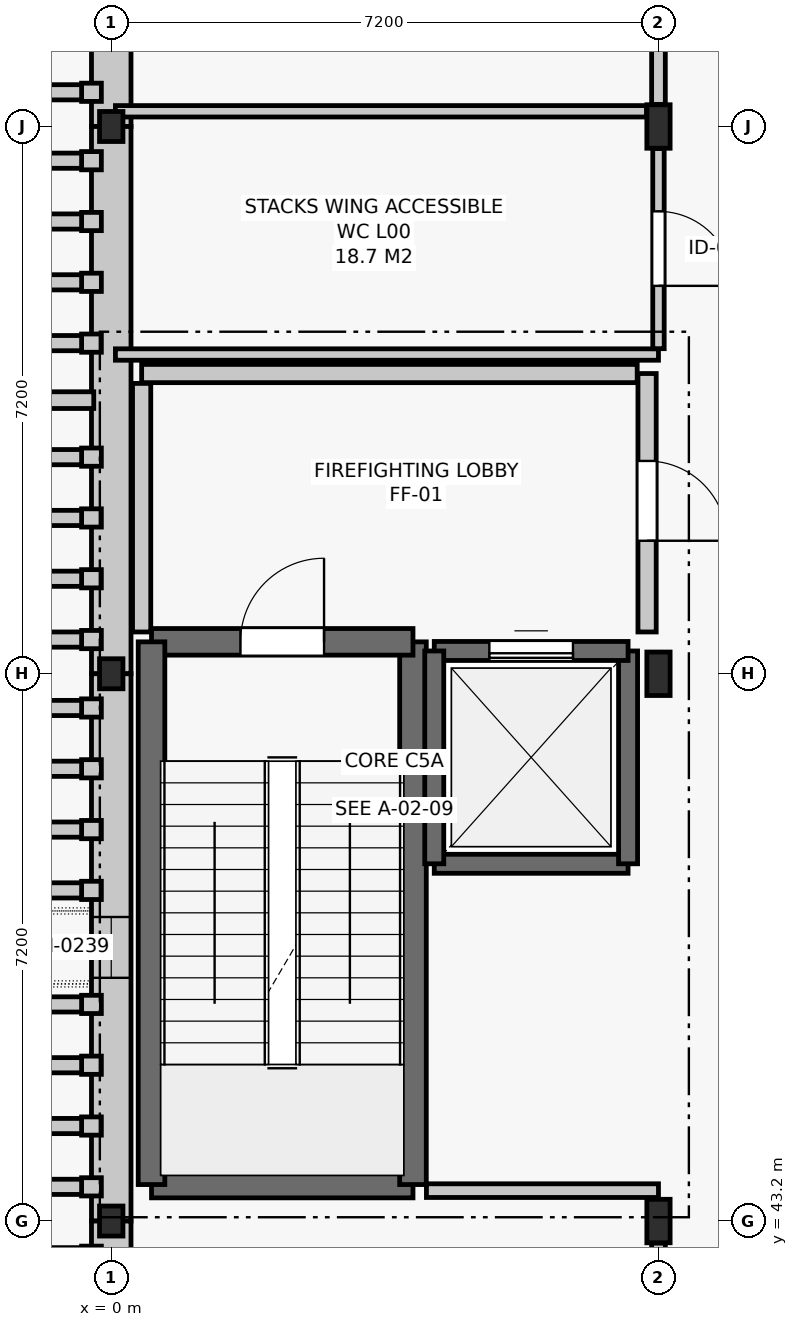
"""IFC4 building model, lengths in metres.
Left out: names, types, materials, properties, quantities, classifications, styles, units other than length and angle.
Written with IfcOpenShell. Run it as: python <this file> out.ifc"""

import sys

from ifc_helpers import new_model, si_unit, direction, frame, frame_2d, origin, origin_2d, place, context, subcontext, project, spatial, rectangle, i_section, extrude, element, fill, save


model = new_model("IFC4")
c1 = context("Model", 3, precision=1e-05, world=origin(), true_north=direction((0.0, 1.0)))
c2 = subcontext(c1, "Body", "Model", "MODEL_VIEW")
j1 = project(units=[si_unit("LENGTHUNIT", "METRE"), si_unit("PLANEANGLEUNIT", "RADIAN")], contexts=[c1])
p1 = place(None, origin())
s1 = spatial("IfcSite", under=j1, at=p1, CompositionType="ELEMENT")
p2 = place(p1, origin())
s2 = spatial("IfcBuilding", under=s1, at=p2, CompositionType="ELEMENT")
p3 = place(p2, origin())
s3 = spatial("IfcBuildingStorey", under=s2, at=p3, CompositionType="ELEMENT", Elevation=0.0)
for number, where, z_axis, x_axis in (
    (1, (0.0, 43.2, 0.0), (0.0, 0.0, 1.0), (1.0, 0.0, 0.0)),
    (2, (0.0, 50.4, 0.0), (0.0, 0.0, 1.0), (1.0, 0.0, 0.0)),
    (3, (0.0, 57.6, 0.0), (0.0, 0.0, 1.0), (1.0, 0.0, 0.0)),
):
    element("IfcColumn", number, at=place(p3, frame(where, z_axis=z_axis, x_axis=x_axis)), inside=s3, PredefinedType="COLUMN", context=c2, shape_type="SweptSolid", body=[
        extrude(i_section(OverallWidth=0.308, OverallDepth=0.395, WebThickness=0.021, FlangeThickness=0.036, FilletRadius=0.027, at=origin_2d()), origin(), (0.0, 0.0, 1.0), 5.4),
    ])
for number, where, z_axis, x_axis in (
    (4, (7.2, 43.2, 0.0), (0.0, 0.0, 1.0), (1.0, 0.0, 0.0)),
    (5, (7.2, 50.4, 0.0), (0.0, 0.0, 1.0), (1.0, 0.0, 0.0)),
    (6, (7.2, 57.6, 0.0), (0.0, 0.0, 1.0), (1.0, 0.0, 0.0)),
):
    element("IfcColumn", number, at=place(p3, frame(where, z_axis=z_axis, x_axis=x_axis)), inside=s3, PredefinedType="COLUMN", context=c2, shape_type="SweptSolid", body=[
        extrude(i_section(OverallWidth=0.306, OverallDepth=0.572, WebThickness=0.021, FlangeThickness=0.04, FilletRadius=0.027, at=origin_2d()), origin(), (0.0, 0.0, 1.0), 5.4),
    ])
p4 = place(p3, frame((0.0, 64.8, 0.0), z_axis=(0.0, 0.0, 1.0), x_axis=(0.0, -1.0, 0.0)))
e7 = element("IfcWall", 7, at=p4, inside=s3, PredefinedType="SOLIDWALL", context=c2, shape_type="SweptSolid", body=[
    extrude(rectangle(XDim=7.2, YDim=0.52, at=frame_2d((3.6, 0.0))), origin(), (0.0, 0.0, 1.0), 4.22),
])
p5 = place(p4, frame((3.2, 0.0, 0.95)))
e8 = element("IfcOpeningElement", 8, at=p5, cuts=e7, PredefinedType="OPENING", context=c2, shape_type="SweptSolid", body=[
    extrude(rectangle(XDim=0.8, YDim=2.15, at=frame_2d((0.4, 1.075))), frame((0.0, 0.272, 0.0), z_axis=(0.0, -1.0, 0.0), x_axis=(1.0, 0.0, 0.0)), (0.0, 0.0, 1.0), 0.544),
])
p6 = place(p3, frame((0.0, 57.6, 0.0), z_axis=(0.0, 0.0, 1.0), x_axis=(0.0, -1.0, 0.0)))
e9 = element("IfcWall", 9, at=p6, inside=s3, PredefinedType="SOLIDWALL", context=c2, shape_type="SweptSolid", body=[
    extrude(rectangle(XDim=7.2, YDim=0.52, at=frame_2d((3.6, 0.0))), origin(), (0.0, 0.0, 1.0), 4.22),
])
p7 = place(p3, frame((0.0, 50.4, 0.0), z_axis=(0.0, 0.0, 1.0), x_axis=(0.0, -1.0, 0.0)))
e10 = element("IfcWall", 10, at=p7, inside=s3, PredefinedType="SOLIDWALL", context=c2, shape_type="SweptSolid", body=[
    extrude(rectangle(XDim=7.2, YDim=0.52, at=frame_2d((3.6, 0.0))), origin(), (0.0, 0.0, 1.0), 4.22),
])
p8 = place(p7, frame((3.2, 0.0, 0.95)))
e11 = element("IfcOpeningElement", 11, at=p8, cuts=e10, PredefinedType="OPENING", context=c2, shape_type="SweptSolid", body=[
    extrude(rectangle(XDim=0.8, YDim=2.15, at=frame_2d((0.4, 1.075))), frame((0.0, 0.272, 0.0), z_axis=(0.0, -1.0, 0.0), x_axis=(1.0, 0.0, 0.0)), (0.0, 0.0, 1.0), 0.544),
])
p9 = place(p3, frame((0.0, 43.2, 0.0), z_axis=(0.0, 0.0, 1.0), x_axis=(0.0, -1.0, 0.0)))
e12 = element("IfcWall", 12, at=p9, inside=s3, PredefinedType="SOLIDWALL", context=c2, shape_type="SweptSolid", body=[
    extrude(rectangle(XDim=7.2, YDim=0.52, at=frame_2d((3.6, 0.0))), origin(), (0.0, 0.0, 1.0), 4.22),
])
p10 = place(p9, frame((3.2, 0.0, 0.95)))
e13 = element("IfcOpeningElement", 13, at=p10, cuts=e12, PredefinedType="OPENING", context=c2, shape_type="SweptSolid", body=[
    extrude(rectangle(XDim=0.8, YDim=2.15, at=frame_2d((0.4, 1.075))), frame((0.0, 0.272, 0.0), z_axis=(0.0, -1.0, 0.0), x_axis=(1.0, 0.0, 0.0)), (0.0, 0.0, 1.0), 0.544),
])
for number, where, z_axis, x_axis in (
    (14, (-1.66, 43.65, 0.0), (0.0, 0.0, 1.0), (1.0, 0.0, 0.0)),
    (15, (-1.66, 44.45, 0.0), (0.0, 0.0, 1.0), (1.0, 0.0, 0.0)),
    (16, (-1.66, 45.25, 0.0), (0.0, 0.0, 1.0), (1.0, 0.0, 0.0)),
    (17, (-1.66, 46.05, 0.0), (0.0, 0.0, 1.0), (1.0, 0.0, 0.0)),
    (18, (-1.66, 47.55, 0.0), (0.0, 0.0, 1.0), (1.0, 0.0, 0.0)),
    (19, (-1.66, 48.35, 0.0), (0.0, 0.0, 1.0), (1.0, 0.0, 0.0)),
    (20, (-1.66, 49.15, 0.0), (0.0, 0.0, 1.0), (1.0, 0.0, 0.0)),
    (21, (-1.66, 49.95, 0.0), (0.0, 0.0, 1.0), (1.0, 0.0, 0.0)),
    (22, (-1.66, 50.85, 0.0), (0.0, 0.0, 1.0), (1.0, 0.0, 0.0)),
    (23, (-1.66, 51.65, 0.0), (0.0, 0.0, 1.0), (1.0, 0.0, 0.0)),
    (24, (-1.66, 52.45, 0.0), (0.0, 0.0, 1.0), (1.0, 0.0, 0.0)),
    (25, (-1.66, 53.25, 0.0), (0.0, 0.0, 1.0), (1.0, 0.0, 0.0)),
    (26, (-1.66, 54.75, 0.0), (0.0, 0.0, 1.0), (1.0, 0.0, 0.0)),
    (27, (-1.66, 55.55, 0.0), (0.0, 0.0, 1.0), (1.0, 0.0, 0.0)),
    (28, (-1.66, 56.35, 0.0), (0.0, 0.0, 1.0), (1.0, 0.0, 0.0)),
    (29, (-1.66, 57.15, 0.0), (0.0, 0.0, 1.0), (1.0, 0.0, 0.0)),
    (30, (-1.66, 58.05, 0.0), (0.0, 0.0, 1.0), (1.0, 0.0, 0.0)),
):
    element("IfcWall", number, at=place(p3, frame(where, z_axis=z_axis, x_axis=x_axis)), inside=s3, PredefinedType="SOLIDWALL", context=c2, shape_type="SweptSolid", body=[
        extrude(rectangle(XDim=1.44, YDim=0.2, at=frame_2d((0.72, 0.0))), origin(), (0.0, 0.0, 1.0), 5.4),
    ])
p11 = place(p3, frame((0.53, 43.68, 0.0), z_axis=(0.0, 0.0, 1.0), x_axis=(1.0, 0.0, 0.0)))
e31 = element("IfcWall", 31, at=p11, inside=s3, PredefinedType="SHEAR", context=c2, shape_type="SweptSolid", body=[
    extrude(rectangle(XDim=3.44, YDim=0.35, at=frame_2d((1.72, 0.0))), origin(), (0.0, 0.0, 1.0), 5.1),
])
p12 = place(p3, frame((3.97, 43.68, 0.0), z_axis=(0.0, 0.0, 1.0), x_axis=(0.0, 1.0, 0.0)))
e32 = element("IfcWall", 32, at=p12, inside=s3, PredefinedType="SHEAR", context=c2, shape_type="SweptSolid", body=[
    extrude(rectangle(XDim=7.14, YDim=0.35, at=frame_2d((3.57, 0.0))), origin(), (0.0, 0.0, 1.0), 5.1),
])
p13 = place(p3, frame((3.97, 50.82, 0.0), z_axis=(0.0, 0.0, 1.0), x_axis=(-1.0, 0.0, 0.0)))
e33 = element("IfcWall", 33, at=p13, inside=s3, PredefinedType="SHEAR", context=c2, shape_type="SweptSolid", body=[
    extrude(rectangle(XDim=3.44, YDim=0.35, at=frame_2d((1.72, 0.0))), origin(), (0.0, 0.0, 1.0), 5.1),
])
p14 = place(p13, frame((1.17, 0.0, 0.0)))
e34 = element("IfcOpeningElement", 34, at=p14, cuts=e33, PredefinedType="OPENING", context=c2, shape_type="SweptSolid", body=[
    extrude(rectangle(XDim=1.1, YDim=2.15, at=frame_2d((0.55, 1.075))), frame((0.0, 0.187, 0.0), z_axis=(0.0, -1.0, 0.0), x_axis=(1.0, 0.0, 0.0)), (0.0, 0.0, 1.0), 0.374),
])
p15 = place(p3, frame((0.53, 50.82, 0.0), z_axis=(0.0, 0.0, 1.0), x_axis=(0.0, -1.0, 0.0)))
e35 = element("IfcWall", 35, at=p15, inside=s3, PredefinedType="SHEAR", context=c2, shape_type="SweptSolid", body=[
    extrude(rectangle(XDim=7.14, YDim=0.35, at=frame_2d((3.57, 0.0))), origin(), (0.0, 0.0, 1.0), 5.1),
])
p16 = place(p3, frame((7.05, 50.95, 0.0), z_axis=(0.0, 0.0, 1.0), x_axis=(0.0, 1.0, 0.0)))
e36 = element("IfcWall", 36, at=p16, inside=s3, PredefinedType="SOLIDWALL", context=c2, shape_type="SweptSolid", body=[
    extrude(rectangle(XDim=3.4, YDim=0.24, at=frame_2d((1.7, 0.0))), origin(), (0.0, 0.0, 1.0), 4.36),
])
p17 = place(p16, frame((1.2, 0.0, 0.0)))
e37 = element("IfcOpeningElement", 37, at=p17, cuts=e36, PredefinedType="OPENING", context=c2, shape_type="SweptSolid", body=[
    extrude(rectangle(XDim=1.05, YDim=2.15, at=frame_2d((0.525, 1.075))), frame((0.0, 0.132, 0.0), z_axis=(0.0, -1.0, 0.0), x_axis=(1.0, 0.0, 0.0)), (0.0, 0.0, 1.0), 0.264),
])
p18 = place(p3, frame((0.4, 54.35, 0.0), z_axis=(0.0, 0.0, 1.0), x_axis=(1.0, 0.0, 0.0)))
e38 = element("IfcWall", 38, at=p18, inside=s3, PredefinedType="SOLIDWALL", context=c2, shape_type="SweptSolid", body=[
    extrude(rectangle(XDim=6.52, YDim=0.24, at=frame_2d((3.26, 0.0))), origin(), (0.0, 0.0, 1.0), 4.36),
])
p19 = place(p3, frame((0.4, 50.95, 0.0), z_axis=(0.0, 0.0, 1.0), x_axis=(0.0, 1.0, 0.0)))
e39 = element("IfcWall", 39, at=p19, inside=s3, PredefinedType="SOLIDWALL", context=c2, shape_type="SweptSolid", body=[
    extrude(rectangle(XDim=3.27, YDim=0.24, at=frame_2d((1.635, 0.0))), origin(), (0.0, 0.0, 1.0), 4.36),
])
p20 = place(p3, frame((4.25, 47.9, 0.0), z_axis=(0.0, 0.0, 1.0), x_axis=(1.0, 0.0, 0.0)))
e40 = element("IfcWall", 40, at=p20, inside=s3, PredefinedType="SHEAR", context=c2, shape_type="SweptSolid", body=[
    extrude(rectangle(XDim=2.55, YDim=0.25, at=frame_2d((1.275, 0.0))), origin(), (0.0, 0.0, 1.0), 5.1),
])
p21 = place(p3, frame((6.8, 47.9, 0.0), z_axis=(0.0, 0.0, 1.0), x_axis=(0.0, 1.0, 0.0)))
e41 = element("IfcWall", 41, at=p21, inside=s3, PredefinedType="SHEAR", context=c2, shape_type="SweptSolid", body=[
    extrude(rectangle(XDim=2.8, YDim=0.25, at=frame_2d((1.4, 0.0))), origin(), (0.0, 0.0, 1.0), 5.1),
])
p22 = place(p3, frame((6.8, 50.7, 0.0), z_axis=(0.0, 0.0, 1.0), x_axis=(-1.0, 0.0, 0.0)))
e42 = element("IfcWall", 42, at=p22, inside=s3, PredefinedType="SHEAR", context=c2, shape_type="SweptSolid", body=[
    extrude(rectangle(XDim=2.55, YDim=0.25, at=frame_2d((1.275, 0.0))), origin(), (0.0, 0.0, 1.0), 5.1),
])
p23 = place(p22, frame((0.725, 0.0, 0.0)))
e43 = element("IfcOpeningElement", 43, at=p23, cuts=e42, PredefinedType="OPENING", context=c2, shape_type="SweptSolid", body=[
    extrude(rectangle(XDim=1.1, YDim=2.1, at=frame_2d((0.55, 1.05))), frame((0.0, 0.137, 0.0), z_axis=(0.0, -1.0, 0.0), x_axis=(1.0, 0.0, 0.0)), (0.0, 0.0, 1.0), 0.274),
])
p24 = place(p3, frame((4.25, 50.7, 0.0), z_axis=(0.0, 0.0, 1.0), x_axis=(0.0, -1.0, 0.0)))
e44 = element("IfcWall", 44, at=p24, inside=s3, PredefinedType="SHEAR", context=c2, shape_type="SweptSolid", body=[
    extrude(rectangle(XDim=2.8, YDim=0.25, at=frame_2d((1.4, 0.0))), origin(), (0.0, 0.0, 1.0), 5.1),
])
p25 = place(p3, frame((0.055, 54.6, 0.0), z_axis=(0.0, 0.0, 1.0), x_axis=(1.0, 0.0, 0.0)))
e45 = element("IfcWall", 45, at=p25, inside=s3, PredefinedType="PARTITIONING", context=c2, shape_type="SweptSolid", body=[
    extrude(rectangle(XDim=7.145, YDim=0.15, at=frame_2d((3.573, 0.0))), origin(), (0.0, 0.0, 1.0), 4.332),
])
p26 = place(p3, frame((0.055, 57.8, 0.0), z_axis=(0.0, 0.0, 1.0), x_axis=(1.0, 0.0, 0.0)))
e46 = element("IfcWall", 46, at=p26, inside=s3, PredefinedType="PARTITIONING", context=c2, shape_type="SweptSolid", body=[
    extrude(rectangle(XDim=6.988, YDim=0.15, at=frame_2d((3.494, 0.0))), origin(), (0.0, 0.0, 1.0), 4.332),
])
p27 = place(p3, frame((4.147, 43.6, 0.0), z_axis=(0.0, 0.0, 1.0), x_axis=(1.0, 0.0, 0.0)))
e47 = element("IfcWall", 47, at=p27, inside=s3, PredefinedType="PARTITIONING", context=c2, shape_type="SweptSolid", body=[
    extrude(rectangle(XDim=3.053, YDim=0.18, at=frame_2d((1.526, 0.0))), origin(), (0.0, 0.0, 1.0), 4.495),
])
p28 = place(p3, frame((7.2, 54.677, 0.0), z_axis=(0.0, 0.0, 1.0), x_axis=(0.0, 1.0, 0.0)))
e48 = element("IfcWall", 48, at=p28, inside=s3, PredefinedType="PARTITIONING", context=c2, shape_type="SweptSolid", body=[
    extrude(rectangle(XDim=2.633, YDim=0.15, at=frame_2d((1.316, 0.0))), origin(), (0.0, 0.0, 1.0), 4.495),
])
p29 = place(p28, frame((0.826, 0.0, 0.0)))
e49 = element("IfcOpeningElement", 49, at=p29, cuts=e48, PredefinedType="OPENING", context=c2, shape_type="SweptSolid", body=[
    extrude(rectangle(XDim=0.98, YDim=2.1, at=frame_2d((0.49, 1.05))), frame((0.0, 0.087, 0.0), z_axis=(0.0, -1.0, 0.0), x_axis=(1.0, 0.0, 0.0)), (0.0, 0.0, 1.0), 0.174),
])
p30 = place(p3, frame((7.2, 36.29, 0.0), z_axis=(0.0, 0.0, 1.0), x_axis=(0.0, 1.0, 0.0)))
e50 = element("IfcWall", 50, at=p30, inside=s3, PredefinedType="PARTITIONING", context=c2, shape_type="SweptSolid", body=[
    extrude(rectangle(XDim=6.62, YDim=0.18, at=frame_2d((3.31, 0.0))), origin(), (0.0, 0.0, 1.0), 4.495),
])
p31 = place(p3, frame((7.2, 57.89, 0.0), z_axis=(0.0, 0.0, 1.0), x_axis=(0.0, 1.0, 0.0)))
e51 = element("IfcWall", 51, at=p31, inside=s3, PredefinedType="PARTITIONING", context=c2, shape_type="SweptSolid", body=[
    extrude(rectangle(XDim=6.62, YDim=0.18, at=frame_2d((3.31, 0.0))), origin(), (0.0, 0.0, 1.0), 4.495),
])
p32 = place(p31, frame((2.485, 0.0, 0.0)))
e52 = element("IfcOpeningElement", 52, at=p32, cuts=e51, PredefinedType="OPENING", context=c2, shape_type="SweptSolid", body=[
    extrude(rectangle(XDim=1.65, YDim=2.25, at=frame_2d((0.825, 1.125))), frame((0.0, 0.102, 0.0), z_axis=(0.0, -1.0, 0.0), x_axis=(1.0, 0.0, 0.0)), (0.0, 0.0, 1.0), 0.204),
])
p33 = place(p8, origin())
e53 = element("IfcWindow", 53, at=p33, inside=s3, PartitioningType="SINGLE_PANEL", PredefinedType="WINDOW", context=c2, shape_type="SweptSolid", body=[
    extrude(rectangle(XDim=0.8, YDim=2.15, at=frame_2d((0.4, 1.075))), frame((0.0, 0.03, 0.0), z_axis=(0.0, -1.0, 0.0), x_axis=(1.0, 0.0, 0.0)), (0.0, 0.0, 1.0), 0.06),
])
fill(e11, e53)
p34 = place(p14, frame((1.1, 0.0, 0.0), z_axis=(0.0, 0.0, 1.0), x_axis=(-1.0, 0.0, 0.0)))
e54 = element("IfcDoor", 54, at=p34, inside=s3, OperationType="SINGLE_SWING_RIGHT", PredefinedType="DOOR", context=c2, shape_type="SweptSolid", body=[
    extrude(rectangle(XDim=1.1, YDim=2.15, at=frame_2d((0.55, 1.075))), frame((0.0, 0.025, 0.0), z_axis=(0.0, -1.0, 0.0), x_axis=(1.0, 0.0, 0.0)), (0.0, 0.0, 1.0), 0.05),
])
fill(e34, e54)
p35 = place(p17, frame((1.05, 0.0, 0.0), z_axis=(0.0, 0.0, 1.0), x_axis=(-1.0, 0.0, 0.0)))
e55 = element("IfcDoor", 55, at=p35, inside=s3, OperationType="SINGLE_SWING_RIGHT", PredefinedType="DOOR", context=c2, shape_type="SweptSolid", body=[
    extrude(rectangle(XDim=1.05, YDim=2.15, at=frame_2d((0.525, 1.075))), frame((0.0, 0.025, 0.0), z_axis=(0.0, -1.0, 0.0), x_axis=(1.0, 0.0, 0.0)), (0.0, 0.0, 1.0), 0.05),
])
fill(e37, e55)
p36 = place(p23, origin())
e56 = element("IfcDoor", 56, at=p36, inside=s3, OperationType="SLIDING_TO_RIGHT", PredefinedType="DOOR", context=c2, shape_type="SweptSolid", body=[
    extrude(rectangle(XDim=1.1, YDim=2.1, at=frame_2d((0.55, 1.05))), frame((0.0, 0.025, 0.0), z_axis=(0.0, -1.0, 0.0), x_axis=(1.0, 0.0, 0.0)), (0.0, 0.0, 1.0), 0.05),
])
fill(e43, e56)
p37 = place(p29, frame((0.98, 0.0, 0.0), z_axis=(0.0, 0.0, 1.0), x_axis=(-1.0, 0.0, 0.0)))
e57 = element("IfcDoor", 57, at=p37, inside=s3, OperationType="SINGLE_SWING_RIGHT", PredefinedType="DOOR", context=c2, shape_type="SweptSolid", body=[
    extrude(rectangle(XDim=0.98, YDim=2.1, at=frame_2d((0.49, 1.05))), frame((0.0, 0.025, 0.0), z_axis=(0.0, -1.0, 0.0), x_axis=(1.0, 0.0, 0.0)), (0.0, 0.0, 1.0), 0.05),
])
fill(e49, e57)
save(model, sys.argv[1])
